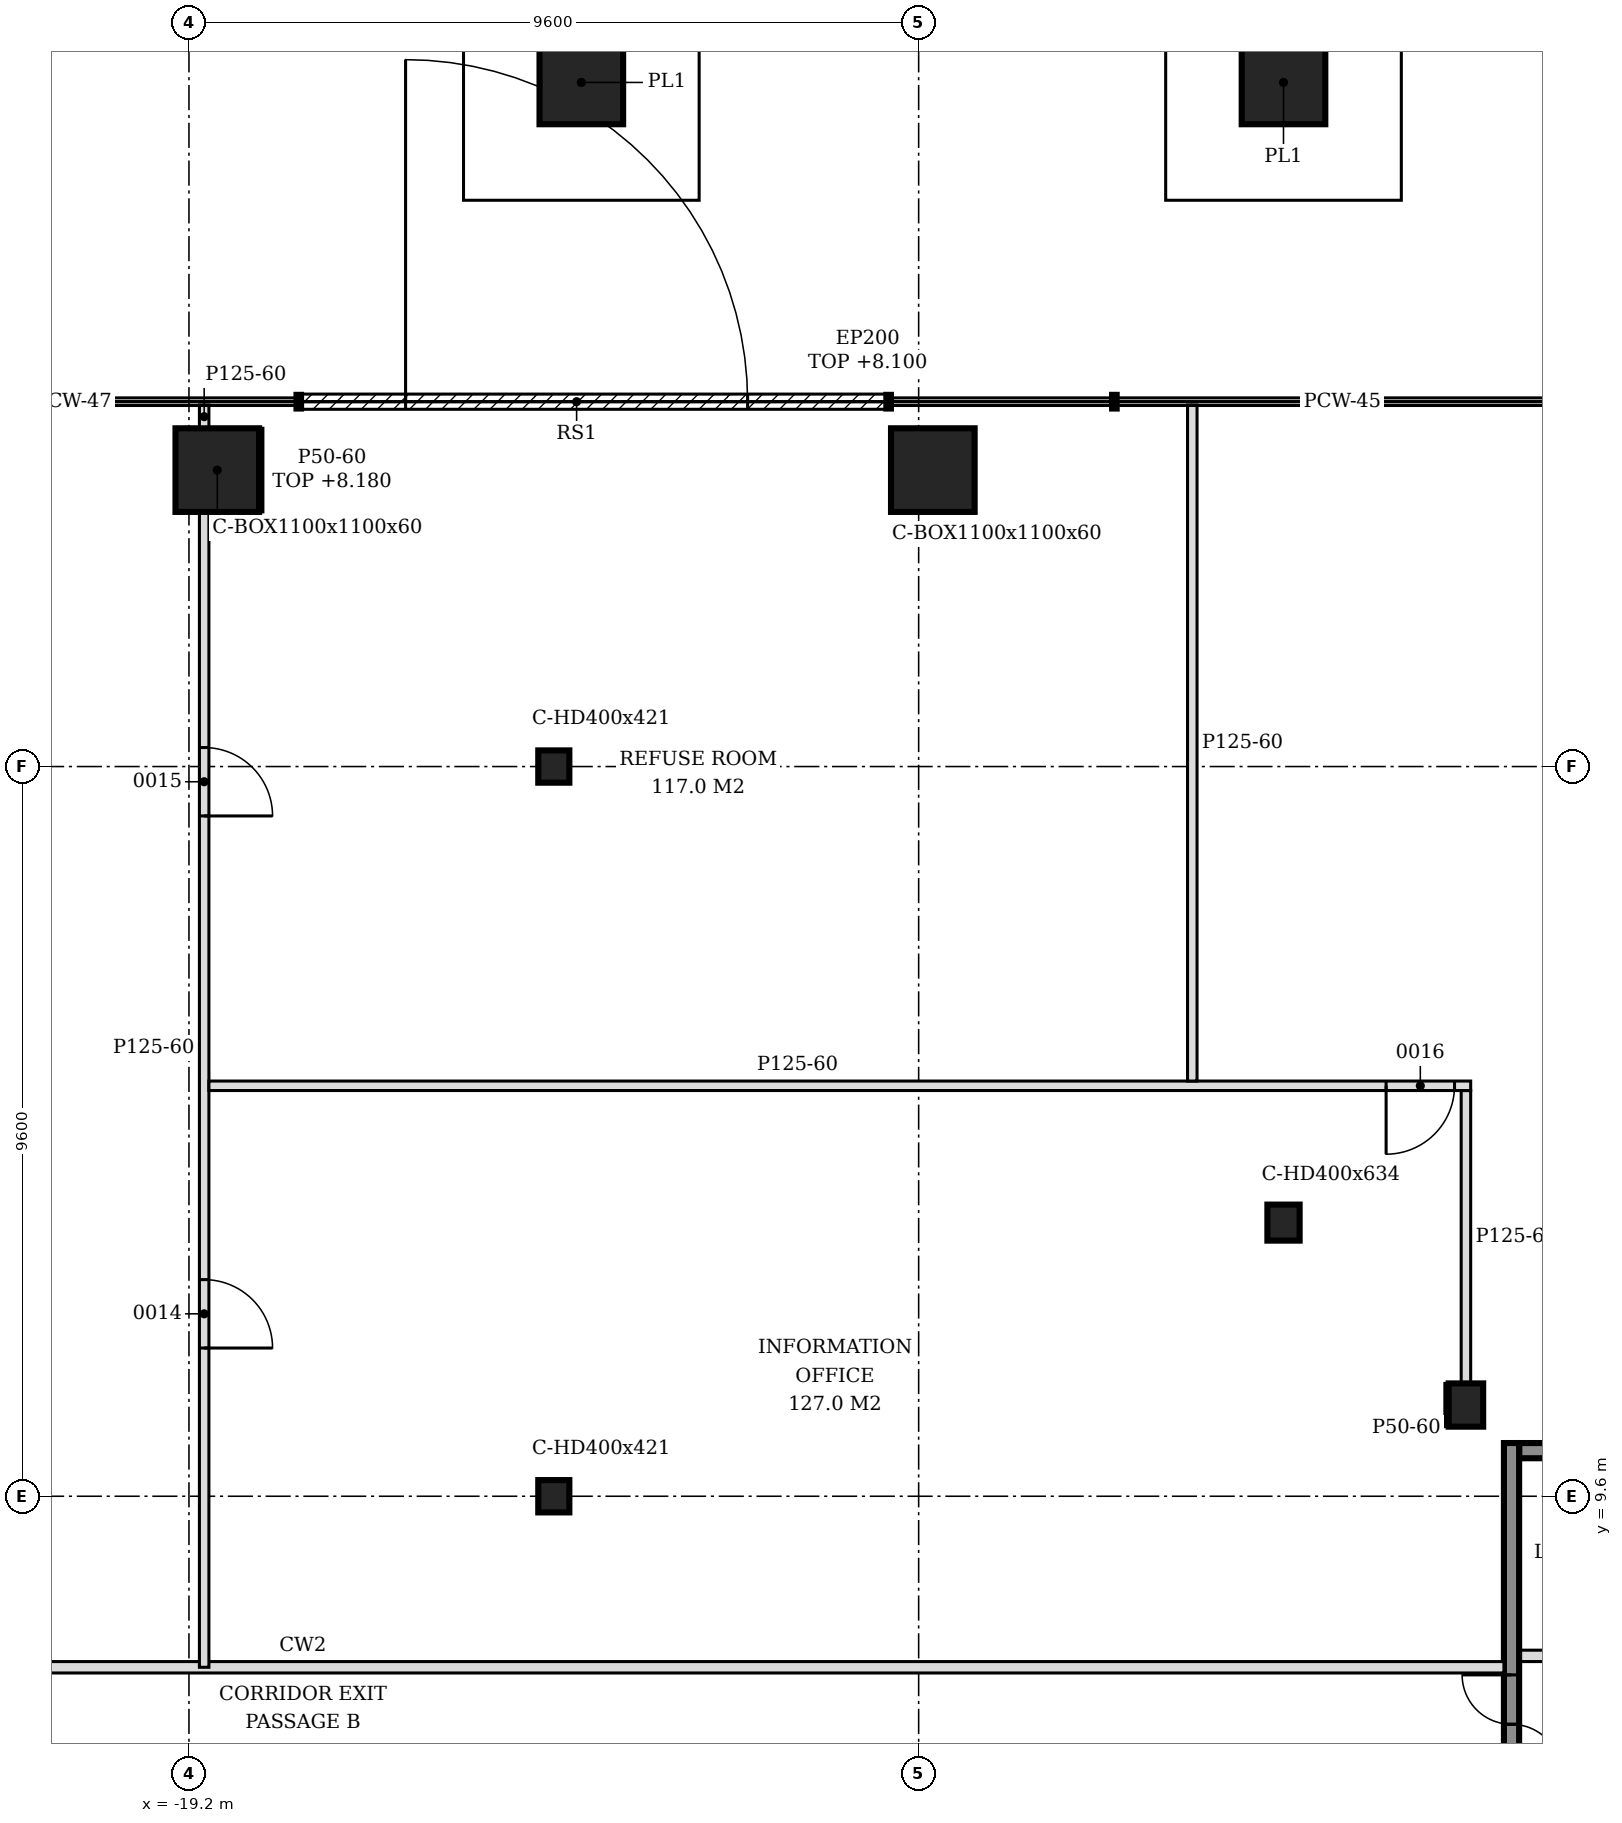
"""IFC4 building model, lengths in metres.
Left out: names, types, materials, properties, quantities, classifications, styles, units other than length and angle.
Written with IfcOpenShell. Run it as: python <this file> out.ifc"""

import sys

from ifc_helpers import new_model, si_unit, direction, frame, frame_2d, origin, origin_2d, place, context, subcontext, project, spatial, polyline, rectangle, hollow_rectangle, i_section, outline, extrude, element, fill, save


model = new_model("IFC4")
c1 = context("Model", 3, precision=1e-05, world=origin(), true_north=direction((0.0, 1.0)))
c2 = subcontext(c1, "Body", "Model", "MODEL_VIEW")
j1 = project(units=[si_unit("LENGTHUNIT", "METRE"), si_unit("PLANEANGLEUNIT", "RADIAN")], contexts=[c1])
p1 = place(None, origin())
s1 = spatial("IfcSite", under=j1, at=p1, CompositionType="ELEMENT")
p2 = place(p1, origin())
s2 = spatial("IfcBuilding", under=s1, at=p2, CompositionType="ELEMENT")
p3 = place(p2, origin())
s3 = spatial("IfcBuildingStorey", under=s2, at=p3, CompositionType="ELEMENT", Elevation=0.0)
for number, where, z_axis, x_axis in (
    (1, (-4.8, 28.2, -0.25), (0.0, 0.0, 1.0), (1.0, 0.0, 0.0)),
    (2, (-14.038, 28.2, -0.25), (0.0, 0.0, 1.0), (1.0, 0.0, 0.0)),
):
    element("IfcColumn", number, at=place(p3, frame(where, z_axis=z_axis, x_axis=x_axis)), inside=s3, PredefinedType="COLUMN", context=c2, shape_type="SweptSolid", body=[
        extrude(hollow_rectangle(XDim=1.1, YDim=1.1, WallThickness=0.06, at=origin_2d()), origin(), (0.0, 0.0, 1.0), 9.25),
    ])
for number, where, z_axis, x_axis in (
    (3, (-9.414, 23.1, -0.25), (0.0, 0.0, 1.0), (1.0, 0.0, 0.0)),
    (4, (-18.827, 23.1, -0.25), (0.0, 0.0, 1.0), (1.0, 0.0, 0.0)),
):
    element("IfcColumn", number, at=place(p3, frame(where, z_axis=z_axis, x_axis=x_axis)), inside=s3, PredefinedType="COLUMN", context=c2, shape_type="SweptSolid", body=[
        extrude(hollow_rectangle(XDim=1.1, YDim=1.1, WallThickness=0.06, at=origin_2d()), origin(), (0.0, 0.0, 1.0), 9.05),
    ])
p4 = place(p3, frame((-4.8, 13.2, -0.25), z_axis=(0.0, 0.0, 1.0), x_axis=(1.0, 0.0, 0.0)))
e5 = element("IfcColumn", 5, at=p4, inside=s3, PredefinedType="COLUMN", context=c2, shape_type="SweptSolid", body=[
    extrude(i_section(OverallWidth=0.424, OverallDepth=0.474, WebThickness=0.048, FlangeThickness=0.077, FilletRadius=0.015, at=origin_2d()), origin(), (0.0, 0.0, 1.0), 9.05),
])
p5 = place(p3, frame((-2.4, 10.8, -0.25), z_axis=(0.0, 0.0, 1.0), x_axis=(1.0, 0.0, 0.0)))
e6 = element("IfcColumn", 6, at=p5, inside=s3, PredefinedType="COLUMN", context=c2, shape_type="SweptSolid", body=[
    extrude(i_section(OverallWidth=0.454, OverallDepth=0.569, WebThickness=0.078, FlangeThickness=0.125, FilletRadius=0.015, at=origin_2d()), origin(), (0.0, 0.0, 1.0), 9.05),
])
for number, where, z_axis, x_axis in (
    (7, (-14.4, 9.6, -0.25), (0.0, 0.0, 1.0), (1.0, 0.0, 0.0)),
    (8, (-14.4, 19.2, -0.25), (0.0, 0.0, 1.0), (1.0, 0.0, 0.0)),
):
    element("IfcColumn", number, at=place(p3, frame(where, z_axis=z_axis, x_axis=x_axis)), inside=s3, PredefinedType="COLUMN", context=c2, shape_type="SweptSolid", body=[
        extrude(i_section(OverallWidth=0.409, OverallDepth=0.425, WebThickness=0.033, FlangeThickness=0.052, FilletRadius=0.015, at=origin_2d()), origin(), (0.0, 0.0, 1.0), 9.05),
    ])
p6 = place(p3, frame((-17.725, 24.0, 0.0), z_axis=(0.0, 0.0, 1.0), x_axis=(1.0, 0.0, 0.0)))
e9 = element("IfcWall", 9, at=p6, inside=s3, PredefinedType="SOLIDWALL", context=c2, shape_type="SweptSolid", body=[
    extrude(rectangle(XDim=7.7, YDim=0.2, at=frame_2d((3.85, 0.0))), origin(), (0.0, 0.0, 1.0), 8.1),
])
p7 = place(p6, frame((1.375, 0.0, 0.0)))
e10 = element("IfcOpeningElement", 10, at=p7, cuts=e9, PredefinedType="OPENING", context=c2, shape_type="SweptSolid", body=[
    extrude(rectangle(XDim=4.5, YDim=4.5, at=frame_2d((2.25, 2.25))), frame((0.0, 0.11, 0.0), z_axis=(0.0, -1.0, 0.0), x_axis=(1.0, 0.0, 0.0)), (0.0, 0.0, 1.0), 0.22),
])
p8 = place(p3, frame((-1.7, 7.5, 0.0), z_axis=(0.0, 0.0, 1.0), x_axis=(1.0, 0.0, 0.0)))
e11 = element("IfcWall", 11, at=p8, inside=s3, PredefinedType="SOLIDWALL", context=c2, shape_type="SweptSolid", body=[
    extrude(rectangle(XDim=4.825, YDim=0.15, at=frame_2d((2.413, 0.0))), origin(), (0.0, 0.0, 1.0), 8.8),
])
p9 = place(p8, frame((0.7, 0.0, 0.0)))
e12 = element("IfcOpeningElement", 12, at=p9, cuts=e11, PredefinedType="OPENING", context=c2, shape_type="SweptSolid", body=[
    extrude(rectangle(XDim=0.9, YDim=2.1, at=frame_2d((0.45, 1.05))), frame((0.0, 0.085, 0.0), z_axis=(0.0, -1.0, 0.0), x_axis=(1.0, 0.0, 0.0)), (0.0, 0.0, 1.0), 0.17),
])
p10 = place(p8, frame((3.2, 0.0, 0.0)))
e13 = element("IfcOpeningElement", 13, at=p10, cuts=e11, PredefinedType="OPENING", context=c2, shape_type="SweptSolid", body=[
    extrude(rectangle(XDim=0.9, YDim=2.1, at=frame_2d((0.45, 1.05))), frame((0.0, 0.085, 0.0), z_axis=(0.0, -1.0, 0.0), x_axis=(1.0, 0.0, 0.0)), (0.0, 0.0, 1.0), 0.17),
])
p11 = place(p3, frame((-1.7, 10.2, 0.0), z_axis=(0.0, 0.0, 1.0), x_axis=(1.0, 0.0, 0.0)))
e14 = element("IfcWall", 14, at=p11, inside=s3, PredefinedType="SOLIDWALL", context=c2, shape_type="SweptSolid", body=[
    extrude(rectangle(XDim=7.9, YDim=0.2, at=frame_2d((3.95, 0.0))), origin(), (0.0, 0.0, 1.0), 8.8),
])
p12 = place(p3, frame((-1.8, -5.5, 0.0), z_axis=(0.0, 0.0, 1.0), x_axis=(0.0, 1.0, 0.0)))
e15 = element("IfcWall", 15, at=p12, inside=s3, PredefinedType="SOLIDWALL", context=c2, shape_type="SweptSolid", body=[
    extrude(rectangle(XDim=15.8, YDim=0.2, at=frame_2d((7.9, 0.0))), origin(), (0.0, 0.0, 1.0), 8.8),
])
p13 = place(p12, frame((3.05, 0.0, 0.0)))
e16 = element("IfcOpeningElement", 16, at=p13, cuts=e15, PredefinedType="OPENING", context=c2, shape_type="SweptSolid", body=[
    extrude(rectangle(XDim=1.3, YDim=2.1, at=frame_2d((0.65, 1.05))), frame((0.0, 0.11, 0.0), z_axis=(0.0, -1.0, 0.0), x_axis=(1.0, 0.0, 0.0)), (0.0, 0.0, 1.0), 0.22),
])
p14 = place(p12, frame((11.45, 0.0, 0.0)))
e17 = element("IfcOpeningElement", 17, at=p14, cuts=e15, PredefinedType="OPENING", context=c2, shape_type="SweptSolid", body=[
    extrude(rectangle(XDim=1.3, YDim=2.1, at=frame_2d((0.65, 1.05))), frame((0.0, 0.11, 0.0), z_axis=(0.0, -1.0, 0.0), x_axis=(1.0, 0.0, 0.0)), (0.0, 0.0, 1.0), 0.22),
])
p15 = place(p3, frame((-33.5, 7.35, 0.0), z_axis=(0.0, 0.0, 1.0), x_axis=(1.0, 0.0, 0.0)))
e18 = element("IfcWall", 18, at=p15, inside=s3, PredefinedType="SOLIDWALL", context=c2, shape_type="SweptSolid", body=[
    extrude(rectangle(XDim=31.6, YDim=0.15, at=frame_2d((15.8, 0.0))), origin(), (0.0, 0.0, 1.0), 8.8),
])
p16 = place(p3, frame((-19.0, 7.35, 0.0), z_axis=(0.0, 0.0, 1.0), x_axis=(0.0, 1.0, 0.0)))
e19 = element("IfcWall", 19, at=p16, inside=s3, PredefinedType="PARTITIONING", context=c2, shape_type="SweptSolid", body=[
    extrude(outline(polyline([(0.0, 0.0), (15.2, 0.0), (15.2, 8.8), (2.4, 8.8), (2.398, 7.98), (2.1, 7.98), (2.098, 8.8), (0.0, 8.8), (0.0, 0.0)])), frame((0.0, 0.062, 0.0), z_axis=(0.0, -1.0, 0.0), x_axis=(1.0, 0.0, 0.0)), (0.0, 0.0, 1.0), 0.125),
])
p17 = place(p16, frame((4.2, 0.0, 0.0)))
e20 = element("IfcOpeningElement", 20, at=p17, cuts=e19, PredefinedType="OPENING", context=c2, shape_type="SweptSolid", body=[
    extrude(rectangle(XDim=0.9, YDim=2.1, at=frame_2d((0.45, 1.05))), frame((0.0, 0.073, 0.0), z_axis=(0.0, -1.0, 0.0), x_axis=(1.0, 0.0, 0.0)), (0.0, 0.0, 1.0), 0.145),
])
p18 = place(p16, frame((11.2, 0.0, 0.0)))
e21 = element("IfcOpeningElement", 21, at=p18, cuts=e19, PredefinedType="OPENING", context=c2, shape_type="SweptSolid", body=[
    extrude(rectangle(XDim=0.9, YDim=2.1, at=frame_2d((0.45, 1.05))), frame((0.0, 0.073, 0.0), z_axis=(0.0, -1.0, 0.0), x_axis=(1.0, 0.0, 0.0)), (0.0, 0.0, 1.0), 0.145),
])
p19 = place(p3, frame((-2.4, 11.084, 0.0), z_axis=(0.0, 0.0, 1.0), x_axis=(0.0, 1.0, 0.0)))
e22 = element("IfcWall", 22, at=p19, inside=s3, PredefinedType="PARTITIONING", context=c2, shape_type="SweptSolid", body=[
    extrude(outline(polyline([(0.0, 0.0), (3.853, 0.0), (3.853, 8.8), (2.265, 8.8), (2.263, 8.08), (1.966, 8.08), (1.963, 8.8), (0.0, 8.8), (0.0, 0.0)])), frame((0.0, 0.062, 0.0), z_axis=(0.0, -1.0, 0.0), x_axis=(1.0, 0.0, 0.0)), (0.0, 0.0, 1.0), 0.125),
])
p20 = place(p3, frame((-18.938, 15.0, 0.0), z_axis=(0.0, 0.0, 1.0), x_axis=(1.0, 0.0, 0.0)))
e23 = element("IfcWall", 23, at=p20, inside=s3, PredefinedType="PARTITIONING", context=c2, shape_type="SweptSolid", body=[
    extrude(outline(polyline([(0.0, 0.0), (16.6, 0.0), (16.6, 8.8), (14.238, 8.8), (14.236, 8.28), (14.038, 8.28), (14.035, 8.8), (9.448, 8.8), (9.446, 8.18), (9.228, 8.18), (9.226, 8.8), (4.637, 8.8), (4.635, 8.28), (4.438, 8.28), (4.436, 8.8), (0.0, 8.8), (0.0, 0.0)])), frame((0.0, 0.062, 0.0), z_axis=(0.0, -1.0, 0.0), x_axis=(1.0, 0.0, 0.0)), (0.0, 0.0, 1.0), 0.125),
])
p21 = place(p20, frame((15.488, 0.0, 0.0)))
e24 = element("IfcOpeningElement", 24, at=p21, cuts=e23, PredefinedType="OPENING", context=c2, shape_type="SweptSolid", body=[
    extrude(rectangle(XDim=0.9, YDim=2.1, at=frame_2d((0.45, 1.05))), frame((0.0, 0.073, 0.0), z_axis=(0.0, -1.0, 0.0), x_axis=(1.0, 0.0, 0.0)), (0.0, 0.0, 1.0), 0.145),
])
p22 = place(p3, frame((-6.0, 15.062, 0.0), z_axis=(0.0, 0.0, 1.0), x_axis=(0.0, 1.0, 0.0)))
e25 = element("IfcWall", 25, at=p22, inside=s3, PredefinedType="PARTITIONING", context=c2, shape_type="SweptSolid", body=[
    extrude(outline(polyline([(0.0, 0.0), (8.894, 0.0), (8.894, 8.8), (8.188, 8.8), (8.186, 8.18), (7.887, 8.18), (7.885, 8.8), (0.0, 8.8), (0.0, 0.0)])), frame((0.0, 0.062, 0.0), z_axis=(0.0, -1.0, 0.0), x_axis=(1.0, 0.0, 0.0)), (0.0, 0.0, 1.0), 0.125),
])
p23 = place(p3, frame((-19.0, 23.65, 0.0), z_axis=(0.0, 0.0, 1.0), x_axis=(0.0, 1.0, 0.0)))
e26 = element("IfcWall", 26, at=p23, inside=s3, PredefinedType="PARTITIONING", context=c2, shape_type="SweptSolid", body=[
    extrude(rectangle(XDim=0.306, YDim=0.125, at=frame_2d((0.153, 0.0))), origin(), (0.0, 0.0, 1.0), 8.8),
])
p24 = place(p3, frame((-18.252, 22.55, 0.0), z_axis=(0.0, 0.0, 1.0), x_axis=(0.0, 1.0, 0.0)))
e27 = element("IfcWall", 27, at=p24, inside=s3, PredefinedType="PARTITIONING", context=c2, shape_type="SweptSolid", body=[
    extrude(rectangle(XDim=1.1, YDim=0.05, at=frame_2d((0.55, 0.0))), origin(), (0.0, 0.0, 1.0), 8.18),
])
p25 = place(p3, frame((-2.652, 10.515, 0.0), z_axis=(0.0, 0.0, 1.0), x_axis=(0.0, 1.0, 0.0)))
e28 = element("IfcWall", 28, at=p25, inside=s3, PredefinedType="PARTITIONING", context=c2, shape_type="SweptSolid", body=[
    extrude(rectangle(XDim=0.569, YDim=0.05, at=frame_2d((0.285, 0.0))), origin(), (0.0, 0.0, 1.0), 8.8),
])
p26 = place(p7, origin())
e29 = element("IfcDoor", 29, at=p26, inside=s3, OperationType="SINGLE_SWING_LEFT", PredefinedType="DOOR", context=c2, shape_type="SweptSolid", body=[
    extrude(rectangle(XDim=4.5, YDim=4.5, at=frame_2d((2.25, 2.25))), frame((0.0, 0.025, 0.0), z_axis=(0.0, -1.0, 0.0), x_axis=(1.0, 0.0, 0.0)), (0.0, 0.0, 1.0), 0.05),
])
fill(e10, e29)
p27 = place(p14, origin())
e30 = element("IfcDoor", 30, at=p27, inside=s3, OperationType="DOUBLE_DOOR_SINGLE_SWING", PredefinedType="DOOR", context=c2, shape_type="SweptSolid", body=[
    extrude(rectangle(XDim=1.3, YDim=2.1, at=frame_2d((0.65, 1.05))), frame((0.0, 0.025, 0.0), z_axis=(0.0, -1.0, 0.0), x_axis=(1.0, 0.0, 0.0)), (0.0, 0.0, 1.0), 0.05),
])
fill(e17, e30)
p28 = place(p17, frame((0.9, 0.0, 0.0), z_axis=(0.0, 0.0, 1.0), x_axis=(-1.0, 0.0, 0.0)))
e31 = element("IfcDoor", 31, at=p28, inside=s3, OperationType="SINGLE_SWING_RIGHT", PredefinedType="DOOR", context=c2, shape_type="SweptSolid", body=[
    extrude(rectangle(XDim=0.9, YDim=2.1, at=frame_2d((0.45, 1.05))), frame((0.0, 0.025, 0.0), z_axis=(0.0, -1.0, 0.0), x_axis=(1.0, 0.0, 0.0)), (0.0, 0.0, 1.0), 0.05),
])
fill(e20, e31)
p29 = place(p18, frame((0.9, 0.0, 0.0), z_axis=(0.0, 0.0, 1.0), x_axis=(-1.0, 0.0, 0.0)))
e32 = element("IfcDoor", 32, at=p29, inside=s3, OperationType="SINGLE_SWING_RIGHT", PredefinedType="DOOR", context=c2, shape_type="SweptSolid", body=[
    extrude(rectangle(XDim=0.9, YDim=2.1, at=frame_2d((0.45, 1.05))), frame((0.0, 0.025, 0.0), z_axis=(0.0, -1.0, 0.0), x_axis=(1.0, 0.0, 0.0)), (0.0, 0.0, 1.0), 0.05),
])
fill(e21, e32)
p30 = place(p21, frame((0.9, 0.0, 0.0), z_axis=(0.0, 0.0, 1.0), x_axis=(-1.0, 0.0, 0.0)))
e33 = element("IfcDoor", 33, at=p30, inside=s3, OperationType="SINGLE_SWING_RIGHT", PredefinedType="DOOR", context=c2, shape_type="SweptSolid", body=[
    extrude(rectangle(XDim=0.9, YDim=2.1, at=frame_2d((0.45, 1.05))), frame((0.0, 0.025, 0.0), z_axis=(0.0, -1.0, 0.0), x_axis=(1.0, 0.0, 0.0)), (0.0, 0.0, 1.0), 0.05),
])
fill(e24, e33)
save(model, sys.argv[1])
